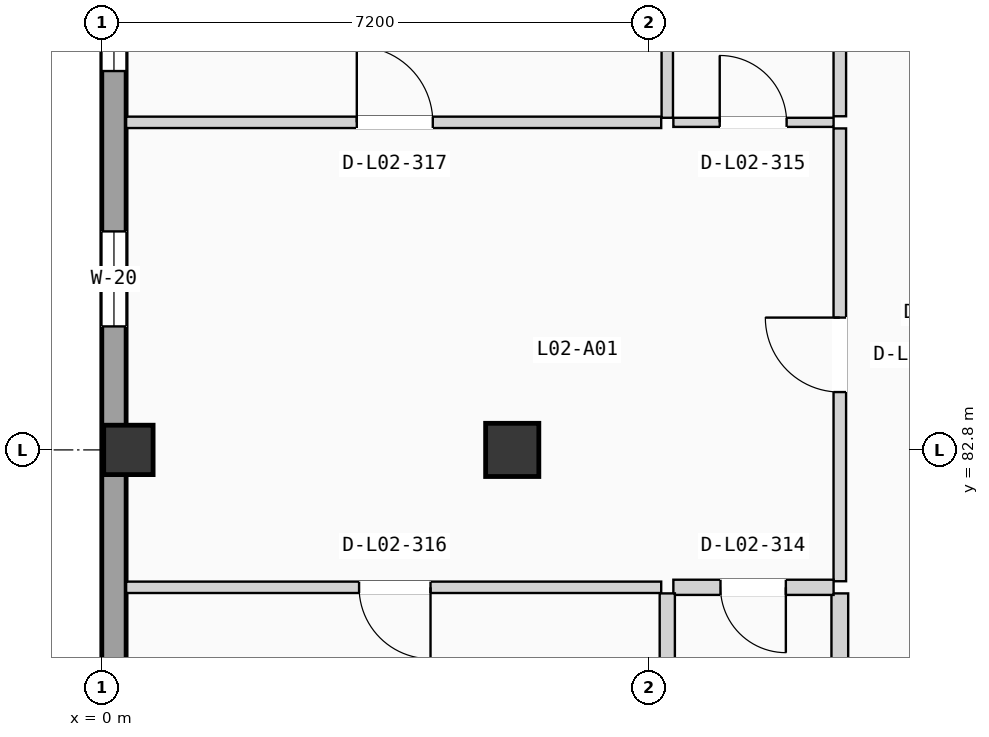
"""IFC4 building model, lengths in metres.
Left out: names, types, materials, properties, quantities, classifications, styles, units other than length and angle.
Written with IfcOpenShell. Run it as: python <this file> out.ifc"""

import sys

from ifc_helpers import new_model, si_unit, direction, frame, frame_2d, origin, origin_2d, place, context, subcontext, project, spatial, rectangle, extrude, element, fill, save


model = new_model("IFC4")
c1 = context("Model", 3, precision=1e-05, world=origin(), true_north=direction((0.0, 1.0)))
c2 = subcontext(c1, "Body", "Model", "MODEL_VIEW")
j1 = project(units=[si_unit("LENGTHUNIT", "METRE"), si_unit("PLANEANGLEUNIT", "RADIAN")], contexts=[c1])
p1 = place(None, origin())
s1 = spatial("IfcSite", under=j1, at=p1, CompositionType="ELEMENT")
p2 = place(p1, origin())
s2 = spatial("IfcBuilding", under=s1, at=p2, CompositionType="ELEMENT")
p3 = place(p2, frame((0.0, 0.0, 8.575)))
s3 = spatial("IfcBuildingStorey", under=s2, at=p3, CompositionType="ELEMENT", Elevation=8.575)
p4 = place(p3, frame((0.35, 82.8, 0.0), z_axis=(0.0, 0.0, 1.0), x_axis=(1.0, 0.0, 0.0)))
e1 = element("IfcColumn", 1, at=p4, inside=s3, PredefinedType="COLUMN", context=c2, shape_type="SweptSolid", body=[
    extrude(rectangle(XDim=0.65, YDim=0.65, at=origin_2d()), origin(), (0.0, 0.0, 1.0), 3.5),
])
p5 = place(p3, frame((5.4, 82.8, 0.0), z_axis=(0.0, 0.0, 1.0), x_axis=(1.0, 0.0, 0.0)))
e2 = element("IfcColumn", 2, at=p5, inside=s3, PredefinedType="COLUMN", context=c2, shape_type="SweptSolid", body=[
    extrude(rectangle(XDim=0.7, YDim=0.7, at=origin_2d()), origin(), (0.0, 0.0, 1.0), 3.5),
])
p6 = place(p3, frame((0.16, 68.72, 0.0), z_axis=(0.0, 0.0, 1.0), x_axis=(0.0, 1.0, 0.0)))
e3 = element("IfcWall", 3, at=p6, inside=s3, PredefinedType="SOLIDWALL", context=c2, shape_type="SweptSolid", body=[
    extrude(rectangle(XDim=49.76, YDim=0.32, at=frame_2d((24.88, 0.0))), origin(), (0.0, 0.0, 1.0), 3.24),
])
p7 = place(p6, frame((15.705, 0.0, 0.755)))
e4 = element("IfcOpeningElement", 4, at=p7, cuts=e3, PredefinedType="OPENING", context=c2, shape_type="SweptSolid", body=[
    extrude(rectangle(XDim=1.25, YDim=1.8, at=frame_2d((0.625, 0.9))), frame((0.0, 0.17, 0.0), z_axis=(0.0, -1.0, 0.0), x_axis=(1.0, 0.0, 0.0)), (0.0, 0.0, 1.0), 0.34),
])
p8 = place(p6, frame((9.061, 0.0, 0.9)))
e5 = element("IfcOpeningElement", 5, at=p8, cuts=e3, PredefinedType="OPENING", context=c2, shape_type="SweptSolid", body=[
    extrude(rectangle(XDim=1.35, YDim=1.2, at=frame_2d((0.675, 0.6))), frame((0.0, 0.17, 0.0), z_axis=(0.0, -1.0, 0.0), x_axis=(1.0, 0.0, 0.0)), (0.0, 0.0, 1.0), 0.34),
])
p9 = place(p6, frame((19.065, 0.0, 0.9)))
e6 = element("IfcOpeningElement", 6, at=p9, cuts=e3, PredefinedType="OPENING", context=c2, shape_type="SweptSolid", body=[
    extrude(rectangle(XDim=1.35, YDim=1.35, at=frame_2d((0.675, 0.675))), frame((0.0, 0.17, 0.0), z_axis=(0.0, -1.0, 0.0), x_axis=(1.0, 0.0, 0.0)), (0.0, 0.0, 1.0), 0.34),
])
p10 = place(p6, frame((31.784, 0.0, 0.9)))
e7 = element("IfcOpeningElement", 7, at=p10, cuts=e3, PredefinedType="OPENING", context=c2, shape_type="SweptSolid", body=[
    extrude(rectangle(XDim=1.35, YDim=1.5, at=frame_2d((0.675, 0.75))), frame((0.0, 0.17, 0.0), z_axis=(0.0, -1.0, 0.0), x_axis=(1.0, 0.0, 0.0)), (0.0, 0.0, 1.0), 0.34),
])
p11 = place(p6, frame((25.211, 0.0, 0.9)))
e8 = element("IfcOpeningElement", 8, at=p11, cuts=e3, PredefinedType="OPENING", context=c2, shape_type="SweptSolid", body=[
    extrude(rectangle(XDim=1.35, YDim=1.65, at=frame_2d((0.675, 0.825))), frame((0.0, 0.17, 0.0), z_axis=(0.0, -1.0, 0.0), x_axis=(1.0, 0.0, 0.0)), (0.0, 0.0, 1.0), 0.34),
])
p12 = place(p6, frame((38.913, 0.0, 0.755)))
e9 = element("IfcOpeningElement", 9, at=p12, cuts=e3, PredefinedType="OPENING", context=c2, shape_type="SweptSolid", body=[
    extrude(rectangle(XDim=1.35, YDim=1.8, at=frame_2d((0.675, 0.9))), frame((0.0, 0.17, 0.0), z_axis=(0.0, -1.0, 0.0), x_axis=(1.0, 0.0, 0.0)), (0.0, 0.0, 1.0), 0.34),
])
p13 = place(p3, frame((9.71, 81.072, 0.0), z_axis=(0.0, 0.0, 1.0), x_axis=(0.0, 1.0, 0.0)))
e10 = element("IfcWall", 10, at=p13, inside=s3, PredefinedType="PARTITIONING", context=c2, shape_type="SweptSolid", body=[
    extrude(rectangle(XDim=5.958, YDim=0.165, at=frame_2d((2.979, 0.0))), origin(), (0.0, 0.0, 1.0), 3.22),
])
p14 = place(p13, frame((2.489, 0.0, 0.0)))
e11 = element("IfcOpeningElement", 11, at=p14, cuts=e10, PredefinedType="OPENING", context=c2, shape_type="SweptSolid", body=[
    extrude(rectangle(XDim=0.98, YDim=2.08, at=frame_2d((0.49, 1.04))), frame((0.0, 0.093, 0.0), z_axis=(0.0, -1.0, 0.0), x_axis=(1.0, 0.0, 0.0)), (0.0, 0.0, 1.0), 0.185),
])
p15 = place(p3, frame((9.71, 76.0, 0.0), z_axis=(0.0, 0.0, 1.0), x_axis=(0.0, 1.0, 0.0)))
e12 = element("IfcWall", 12, at=p15, inside=s3, PredefinedType="PLUMBINGWALL", context=c2, shape_type="SweptSolid", body=[
    extrude(rectangle(XDim=4.912, YDim=0.22, at=frame_2d((2.456, 0.0))), origin(), (0.0, 0.0, 1.0), 3.22),
])
p16 = place(p3, frame((9.71, 87.19, 0.0), z_axis=(0.0, 0.0, 1.0), x_axis=(0.0, 1.0, 0.0)))
e13 = element("IfcWall", 13, at=p16, inside=s3, PredefinedType="PARTITIONING", context=c2, shape_type="SweptSolid", body=[
    extrude(rectangle(XDim=4.912, YDim=0.165, at=frame_2d((2.456, 0.0))), origin(), (0.0, 0.0, 1.0), 3.22),
])
p17 = place(p3, frame((7.52, 80.992, 0.0), z_axis=(0.0, 0.0, 1.0), x_axis=(1.0, 0.0, 0.0)))
e14 = element("IfcWall", 14, at=p17, inside=s3, PredefinedType="PLUMBINGWALL", context=c2, shape_type="SweptSolid", body=[
    extrude(rectangle(XDim=2.108, YDim=0.2, at=frame_2d((1.054, 0.0))), origin(), (0.0, 0.0, 1.0), 3.22),
])
p18 = place(p17, frame((0.62, 0.0, 0.0)))
e15 = element("IfcOpeningElement", 15, at=p18, cuts=e14, PredefinedType="OPENING", context=c2, shape_type="SweptSolid", body=[
    extrude(rectangle(XDim=0.86, YDim=2.0, at=frame_2d((0.43, 1.0))), frame((0.0, 0.11, 0.0), z_axis=(0.0, -1.0, 0.0), x_axis=(1.0, 0.0, 0.0)), (0.0, 0.0, 1.0), 0.22),
])
p19 = place(p3, frame((7.52, 87.11, 0.0), z_axis=(0.0, 0.0, 1.0), x_axis=(1.0, 0.0, 0.0)))
e16 = element("IfcWall", 16, at=p19, inside=s3, PredefinedType="PARTITIONING", context=c2, shape_type="SweptSolid", body=[
    extrude(rectangle(XDim=2.108, YDim=0.12, at=frame_2d((1.054, 0.0))), origin(), (0.0, 0.0, 1.0), 3.22),
])
p20 = place(p19, frame((0.61, 0.0, 0.0)))
e17 = element("IfcOpeningElement", 17, at=p20, cuts=e16, PredefinedType="OPENING", context=c2, shape_type="SweptSolid", body=[
    extrude(rectangle(XDim=0.88, YDim=2.02, at=frame_2d((0.44, 1.01))), frame((0.0, 0.07, 0.0), z_axis=(0.0, -1.0, 0.0), x_axis=(1.0, 0.0, 0.0)), (0.0, 0.0, 1.0), 0.14),
])
p21 = place(p3, frame((0.32, 80.992, 0.0), z_axis=(0.0, 0.0, 1.0), x_axis=(1.0, 0.0, 0.0)))
e18 = element("IfcWall", 18, at=p21, inside=s3, PredefinedType="PARTITIONING", context=c2, shape_type="SweptSolid", body=[
    extrude(rectangle(XDim=7.04, YDim=0.15, at=frame_2d((3.52, 0.0))), origin(), (0.0, 0.0, 1.0), 3.22),
])
p22 = place(p21, frame((3.065, 0.0, 0.0)))
e19 = element("IfcOpeningElement", 19, at=p22, cuts=e18, PredefinedType="OPENING", context=c2, shape_type="SweptSolid", body=[
    extrude(rectangle(XDim=0.94, YDim=2.06, at=frame_2d((0.47, 1.03))), frame((0.0, 0.085, 0.0), z_axis=(0.0, -1.0, 0.0), x_axis=(1.0, 0.0, 0.0)), (0.0, 0.0, 1.0), 0.17),
])
p23 = place(p3, frame((0.32, 87.11, 0.0), z_axis=(0.0, 0.0, 1.0), x_axis=(1.0, 0.0, 0.0)))
e20 = element("IfcWall", 20, at=p23, inside=s3, PredefinedType="PARTITIONING", context=c2, shape_type="SweptSolid", body=[
    extrude(rectangle(XDim=7.04, YDim=0.15, at=frame_2d((3.52, 0.0))), origin(), (0.0, 0.0, 1.0), 3.22),
])
p24 = place(p23, frame((3.035, 0.0, 0.0)))
e21 = element("IfcOpeningElement", 21, at=p24, cuts=e20, PredefinedType="OPENING", context=c2, shape_type="SweptSolid", body=[
    extrude(rectangle(XDim=1.0, YDim=2.06, at=frame_2d((0.5, 1.03))), frame((0.0, 0.085, 0.0), z_axis=(0.0, -1.0, 0.0), x_axis=(1.0, 0.0, 0.0)), (0.0, 0.0, 1.0), 0.17),
])
p25 = place(p3, frame((7.44, 76.0, 0.0), z_axis=(0.0, 0.0, 1.0), x_axis=(0.0, 1.0, 0.0)))
e22 = element("IfcWall", 22, at=p25, inside=s3, PredefinedType="PLUMBINGWALL", context=c2, shape_type="SweptSolid", body=[
    extrude(rectangle(XDim=4.912, YDim=0.2, at=frame_2d((2.456, 0.0))), origin(), (0.0, 0.0, 1.0), 3.22),
])
p26 = place(p3, frame((7.44, 87.17, 0.0), z_axis=(0.0, 0.0, 1.0), x_axis=(0.0, 1.0, 0.0)))
e23 = element("IfcWall", 23, at=p26, inside=s3, PredefinedType="PARTITIONING", context=c2, shape_type="SweptSolid", body=[
    extrude(rectangle(XDim=4.932, YDim=0.15, at=frame_2d((2.466, 0.0))), origin(), (0.0, 0.0, 1.0), 3.22),
])
p27 = place(p7, origin())
e24 = element("IfcWindow", 24, at=p27, inside=s3, PartitioningType="SINGLE_PANEL", PredefinedType="WINDOW", context=c2, shape_type="SweptSolid", body=[
    extrude(rectangle(XDim=1.25, YDim=1.8, at=frame_2d((0.625, 0.9))), frame((0.0, 0.03, 0.0), z_axis=(0.0, -1.0, 0.0), x_axis=(1.0, 0.0, 0.0)), (0.0, 0.0, 1.0), 0.06),
])
fill(e4, e24)
p28 = place(p9, origin())
e25 = element("IfcWindow", 25, at=p28, inside=s3, PartitioningType="SINGLE_PANEL", PredefinedType="WINDOW", context=c2, shape_type="SweptSolid", body=[
    extrude(rectangle(XDim=1.35, YDim=1.35, at=frame_2d((0.675, 0.675))), frame((0.0, 0.03, 0.0), z_axis=(0.0, -1.0, 0.0), x_axis=(1.0, 0.0, 0.0)), (0.0, 0.0, 1.0), 0.06),
])
fill(e6, e25)
p29 = place(p14, origin())
e26 = element("IfcDoor", 26, at=p29, inside=s3, OperationType="SINGLE_SWING_RIGHT", PredefinedType="DOOR", context=c2, shape_type="SweptSolid", body=[
    extrude(rectangle(XDim=0.98, YDim=2.08, at=frame_2d((0.49, 1.04))), frame((0.0, 0.025, 0.0), z_axis=(0.0, -1.0, 0.0), x_axis=(1.0, 0.0, 0.0)), (0.0, 0.0, 1.0), 0.05),
])
fill(e11, e26)
p30 = place(p18, frame((0.86, 0.0, 0.0), z_axis=(0.0, 0.0, 1.0), x_axis=(-1.0, 0.0, 0.0)))
e27 = element("IfcDoor", 27, at=p30, inside=s3, OperationType="SINGLE_SWING_RIGHT", PredefinedType="DOOR", context=c2, shape_type="SweptSolid", body=[
    extrude(rectangle(XDim=0.86, YDim=2.0, at=frame_2d((0.43, 1.0))), frame((0.0, 0.025, 0.0), z_axis=(0.0, -1.0, 0.0), x_axis=(1.0, 0.0, 0.0)), (0.0, 0.0, 1.0), 0.05),
])
fill(e15, e27)
p31 = place(p20, origin())
e28 = element("IfcDoor", 28, at=p31, inside=s3, OperationType="SINGLE_SWING_LEFT", PredefinedType="DOOR", context=c2, shape_type="SweptSolid", body=[
    extrude(rectangle(XDim=0.88, YDim=2.02, at=frame_2d((0.44, 1.01))), frame((0.0, 0.025, 0.0), z_axis=(0.0, -1.0, 0.0), x_axis=(1.0, 0.0, 0.0)), (0.0, 0.0, 1.0), 0.05),
])
fill(e17, e28)
p32 = place(p22, frame((0.94, 0.0, 0.0), z_axis=(0.0, 0.0, 1.0), x_axis=(-1.0, 0.0, 0.0)))
e29 = element("IfcDoor", 29, at=p32, inside=s3, OperationType="SINGLE_SWING_RIGHT", PredefinedType="DOOR", context=c2, shape_type="SweptSolid", body=[
    extrude(rectangle(XDim=0.94, YDim=2.06, at=frame_2d((0.47, 1.03))), frame((0.0, 0.025, 0.0), z_axis=(0.0, -1.0, 0.0), x_axis=(1.0, 0.0, 0.0)), (0.0, 0.0, 1.0), 0.05),
])
fill(e19, e29)
p33 = place(p24, origin())
e30 = element("IfcDoor", 30, at=p33, inside=s3, OperationType="SINGLE_SWING_LEFT", PredefinedType="DOOR", context=c2, shape_type="SweptSolid", body=[
    extrude(rectangle(XDim=1.0, YDim=2.06, at=frame_2d((0.5, 1.03))), frame((0.0, 0.025, 0.0), z_axis=(0.0, -1.0, 0.0), x_axis=(1.0, 0.0, 0.0)), (0.0, 0.0, 1.0), 0.05),
])
fill(e21, e30)
save(model, sys.argv[1])
